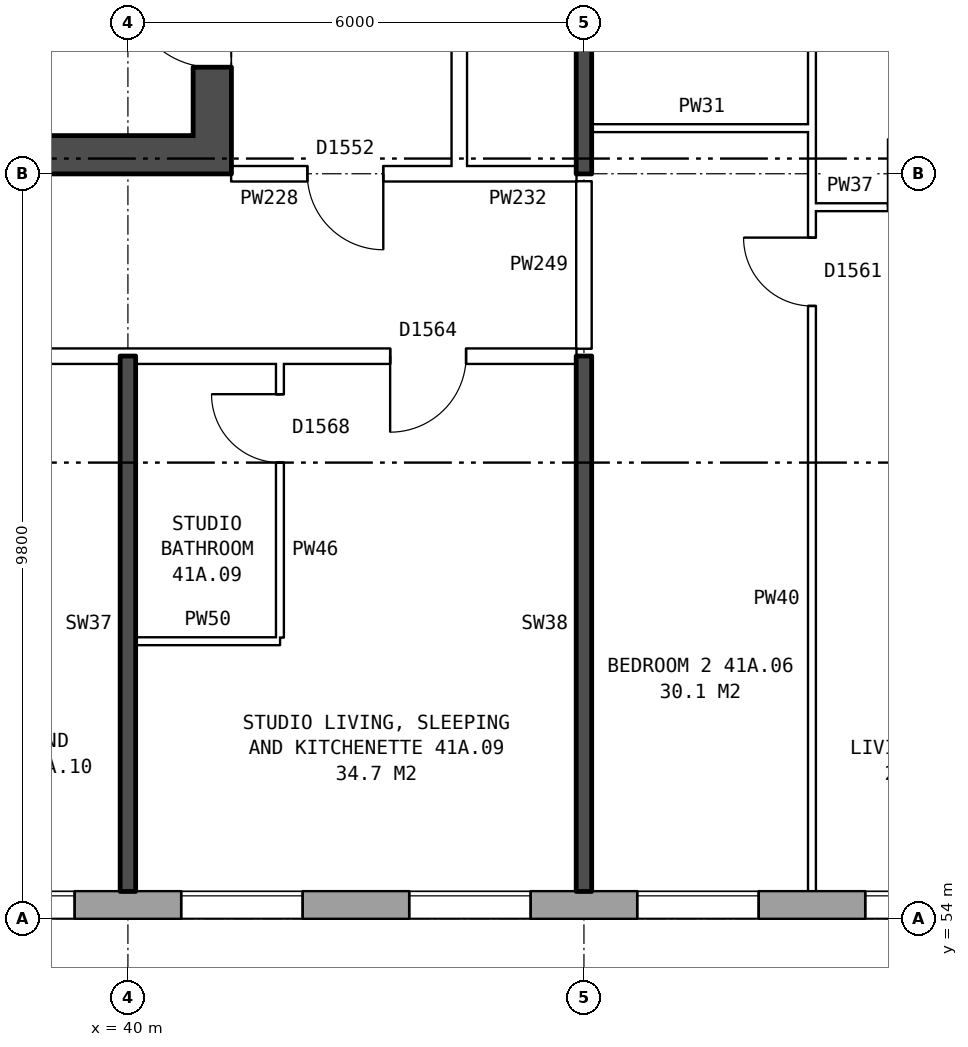
"""IFC4 building model, lengths in metres.
Left out: names, types, materials, properties, quantities, classifications, styles, units other than length and angle.
Written with IfcOpenShell. Run it as: python <this file> out.ifc"""

import sys

from ifc_helpers import new_model, si_unit, direction, frame, frame_2d, origin, place, context, subcontext, project, spatial, rectangle, extrude, element, fill, save


model = new_model("IFC4")
c1 = context("Model", 3, precision=1e-05, world=origin(), true_north=direction((0.0, 1.0)))
c2 = subcontext(c1, "Body", "Model", "MODEL_VIEW")
j1 = project(units=[si_unit("LENGTHUNIT", "METRE"), si_unit("PLANEANGLEUNIT", "RADIAN")], contexts=[c1])
p1 = place(None, origin())
s1 = spatial("IfcSite", under=j1, at=p1, CompositionType="ELEMENT")
p2 = place(p1, origin())
s2 = spatial("IfcBuilding", under=s1, at=p2, CompositionType="ELEMENT")
p3 = place(p2, frame((0.0, 0.0, 148.5)))
s3 = spatial("IfcBuildingStorey", under=s2, at=p3, CompositionType="ELEMENT", Elevation=148.5)
p4 = place(p3, frame((31.575, 54.18, 0.0), z_axis=(0.0, 0.0, 1.0), x_axis=(1.0, 0.0, 0.0)))
e1 = element("IfcWall", 1, at=p4, inside=s3, PredefinedType="STANDARD", context=c2, shape_type="SweptSolid", body=[
    extrude(rectangle(XDim=41.351, YDim=0.36, at=frame_2d((20.675, 0.0))), origin(), (0.0, 0.0, 1.0), 2.85),
])
p5 = place(p4, frame((3.125, 0.0, 0.8)))
e2 = element("IfcOpeningElement", 2, at=p5, cuts=e1, PredefinedType="OPENING", context=c2, shape_type="SweptSolid", body=[
    extrude(rectangle(XDim=1.6, YDim=1.8, at=frame_2d((0.8, 0.9))), frame((0.0, 0.19, 0.0), z_axis=(0.0, -1.0, 0.0), x_axis=(1.0, 0.0, 0.0)), (0.0, 0.0, 1.0), 0.38),
])
p6 = place(p4, frame((6.125, 0.0, 0.8)))
e3 = element("IfcOpeningElement", 3, at=p6, cuts=e1, PredefinedType="OPENING", context=c2, shape_type="SweptSolid", body=[
    extrude(rectangle(XDim=1.6, YDim=1.8, at=frame_2d((0.8, 0.9))), frame((0.0, 0.19, 0.0), z_axis=(0.0, -1.0, 0.0), x_axis=(1.0, 0.0, 0.0)), (0.0, 0.0, 1.0), 0.38),
])
p7 = place(p4, frame((9.125, 0.0, 0.8)))
e4 = element("IfcOpeningElement", 4, at=p7, cuts=e1, PredefinedType="OPENING", context=c2, shape_type="SweptSolid", body=[
    extrude(rectangle(XDim=1.6, YDim=1.8, at=frame_2d((0.8, 0.9))), frame((0.0, 0.19, 0.0), z_axis=(0.0, -1.0, 0.0), x_axis=(1.0, 0.0, 0.0)), (0.0, 0.0, 1.0), 0.38),
])
p8 = place(p4, frame((12.125, 0.0, 0.8)))
e5 = element("IfcOpeningElement", 5, at=p8, cuts=e1, PredefinedType="OPENING", context=c2, shape_type="SweptSolid", body=[
    extrude(rectangle(XDim=1.6, YDim=1.8, at=frame_2d((0.8, 0.9))), frame((0.0, 0.19, 0.0), z_axis=(0.0, -1.0, 0.0), x_axis=(1.0, 0.0, 0.0)), (0.0, 0.0, 1.0), 0.38),
])
p9 = place(p4, frame((15.125, 0.0, 0.8)))
e6 = element("IfcOpeningElement", 6, at=p9, cuts=e1, PredefinedType="OPENING", context=c2, shape_type="SweptSolid", body=[
    extrude(rectangle(XDim=1.6, YDim=1.8, at=frame_2d((0.8, 0.9))), frame((0.0, 0.19, 0.0), z_axis=(0.0, -1.0, 0.0), x_axis=(1.0, 0.0, 0.0)), (0.0, 0.0, 1.0), 0.38),
])
p10 = place(p4, frame((18.125, 0.0, 0.8)))
e7 = element("IfcOpeningElement", 7, at=p10, cuts=e1, PredefinedType="OPENING", context=c2, shape_type="SweptSolid", body=[
    extrude(rectangle(XDim=1.6, YDim=1.8, at=frame_2d((0.8, 0.9))), frame((0.0, 0.19, 0.0), z_axis=(0.0, -1.0, 0.0), x_axis=(1.0, 0.0, 0.0)), (0.0, 0.0, 1.0), 0.38),
])
p11 = place(p4, frame((21.125, 0.0, 0.8)))
e8 = element("IfcOpeningElement", 8, at=p11, cuts=e1, PredefinedType="OPENING", context=c2, shape_type="SweptSolid", body=[
    extrude(rectangle(XDim=1.6, YDim=1.8, at=frame_2d((0.8, 0.9))), frame((0.0, 0.19, 0.0), z_axis=(0.0, -1.0, 0.0), x_axis=(1.0, 0.0, 0.0)), (0.0, 0.0, 1.0), 0.38),
])
p12 = place(p4, frame((24.125, 0.0, 0.8)))
e9 = element("IfcOpeningElement", 9, at=p12, cuts=e1, PredefinedType="OPENING", context=c2, shape_type="SweptSolid", body=[
    extrude(rectangle(XDim=1.6, YDim=1.8, at=frame_2d((0.8, 0.9))), frame((0.0, 0.19, 0.0), z_axis=(0.0, -1.0, 0.0), x_axis=(1.0, 0.0, 0.0)), (0.0, 0.0, 1.0), 0.38),
])
p13 = place(p4, frame((27.125, 0.0, 0.8)))
e10 = element("IfcOpeningElement", 10, at=p13, cuts=e1, PredefinedType="OPENING", context=c2, shape_type="SweptSolid", body=[
    extrude(rectangle(XDim=1.6, YDim=1.8, at=frame_2d((0.8, 0.9))), frame((0.0, 0.19, 0.0), z_axis=(0.0, -1.0, 0.0), x_axis=(1.0, 0.0, 0.0)), (0.0, 0.0, 1.0), 0.38),
])
p14 = place(p4, frame((30.125, 0.0, 0.8)))
e11 = element("IfcOpeningElement", 11, at=p14, cuts=e1, PredefinedType="OPENING", context=c2, shape_type="SweptSolid", body=[
    extrude(rectangle(XDim=1.6, YDim=1.8, at=frame_2d((0.8, 0.9))), frame((0.0, 0.19, 0.0), z_axis=(0.0, -1.0, 0.0), x_axis=(1.0, 0.0, 0.0)), (0.0, 0.0, 1.0), 0.38),
])
p15 = place(p4, frame((33.125, 0.0, 0.8)))
e12 = element("IfcOpeningElement", 12, at=p15, cuts=e1, PredefinedType="OPENING", context=c2, shape_type="SweptSolid", body=[
    extrude(rectangle(XDim=1.6, YDim=1.8, at=frame_2d((0.8, 0.9))), frame((0.0, 0.19, 0.0), z_axis=(0.0, -1.0, 0.0), x_axis=(1.0, 0.0, 0.0)), (0.0, 0.0, 1.0), 0.38),
])
p16 = place(p4, frame((36.125, 0.0, 0.8)))
e13 = element("IfcOpeningElement", 13, at=p16, cuts=e1, PredefinedType="OPENING", context=c2, shape_type="SweptSolid", body=[
    extrude(rectangle(XDim=1.6, YDim=1.8, at=frame_2d((0.8, 0.9))), frame((0.0, 0.19, 0.0), z_axis=(0.0, -1.0, 0.0), x_axis=(1.0, 0.0, 0.0)), (0.0, 0.0, 1.0), 0.38),
])
p17 = place(p4, frame((38.625, 0.0, 0.8)))
e14 = element("IfcOpeningElement", 14, at=p17, cuts=e1, PredefinedType="OPENING", context=c2, shape_type="SweptSolid", body=[
    extrude(rectangle(XDim=1.2, YDim=1.8, at=frame_2d((0.6, 0.9))), frame((0.0, 0.19, 0.0), z_axis=(0.0, -1.0, 0.0), x_axis=(1.0, 0.0, 0.0)), (0.0, 0.0, 1.0), 0.38),
])
p18 = place(p4, frame((40.125, 0.0, 0.8)))
e15 = element("IfcOpeningElement", 15, at=p18, cuts=e1, PredefinedType="OPENING", context=c2, shape_type="SweptSolid", body=[
    extrude(rectangle(XDim=0.8, YDim=0.9, at=frame_2d((0.4, 0.45))), frame((0.0, 0.19, 0.0), z_axis=(0.0, -1.0, 0.0), x_axis=(1.0, 0.0, 0.0)), (0.0, 0.0, 1.0), 0.38),
])
p19 = place(p3, frame((41.11, 76.2, 0.0), z_axis=(0.0, 0.0, 1.0), x_axis=(0.0, -1.0, 0.0)))
e16 = element("IfcWall", 16, at=p19, inside=s3, PredefinedType="SHEAR", context=c2, shape_type="SweptSolid", body=[
    extrude(rectangle(XDim=12.4, YDim=0.5, at=frame_2d((6.2, 0.0))), origin(), (0.0, 0.0, 1.0), 2.85),
])
p20 = place(p19, frame((1.325, 0.0, 0.0)))
e17 = element("IfcOpeningElement", 17, at=p20, cuts=e16, PredefinedType="OPENING", context=c2, shape_type="SweptSolid", body=[
    extrude(rectangle(XDim=1.1, YDim=2.1, at=frame_2d((0.55, 1.05))), frame((0.0, 0.26, 0.0), z_axis=(0.0, -1.0, 0.0), x_axis=(1.0, 0.0, 0.0)), (0.0, 0.0, 1.0), 0.52),
])
p21 = place(p19, frame((4.225, 0.0, 0.0)))
e18 = element("IfcOpeningElement", 18, at=p21, cuts=e16, PredefinedType="OPENING", context=c2, shape_type="SweptSolid", body=[
    extrude(rectangle(XDim=0.85, YDim=2.1, at=frame_2d((0.425, 1.05))), frame((0.0, 0.26, 0.0), z_axis=(0.0, -1.0, 0.0), x_axis=(1.0, 0.0, 0.0)), (0.0, 0.0, 1.0), 0.52),
])
p22 = place(p19, frame((7.475, 0.0, 0.0)))
e19 = element("IfcOpeningElement", 19, at=p22, cuts=e16, PredefinedType="OPENING", context=c2, shape_type="SweptSolid", body=[
    extrude(rectangle(XDim=0.85, YDim=2.1, at=frame_2d((0.425, 1.05))), frame((0.0, 0.26, 0.0), z_axis=(0.0, -1.0, 0.0), x_axis=(1.0, 0.0, 0.0)), (0.0, 0.0, 1.0), 0.52),
])
p23 = place(p19, frame((9.9, 0.0, 0.0)))
e20 = element("IfcOpeningElement", 20, at=p23, cuts=e16, PredefinedType="OPENING", context=c2, shape_type="SweptSolid", body=[
    extrude(rectangle(XDim=1.1, YDim=2.1, at=frame_2d((0.55, 1.05))), frame((0.0, 0.26, 0.0), z_axis=(0.0, -1.0, 0.0), x_axis=(1.0, 0.0, 0.0)), (0.0, 0.0, 1.0), 0.52),
])
p24 = place(p3, frame((40.86, 64.05, 0.0), z_axis=(0.0, 0.0, 1.0), x_axis=(-1.0, 0.0, 0.0)))
e21 = element("IfcWall", 21, at=p24, inside=s3, PredefinedType="SHEAR", context=c2, shape_type="SweptSolid", body=[
    extrude(rectangle(XDim=8.0, YDim=0.5, at=frame_2d((4.0, 0.0))), origin(), (0.0, 0.0, 1.0), 2.85),
])
p25 = place(p3, frame((44.36, 63.9, 0.0), z_axis=(0.0, 0.0, 1.0), x_axis=(0.0, 1.0, 0.0)))
e22 = element("IfcWall", 22, at=p25, inside=s3, PredefinedType="PARTITIONING", context=c2, shape_type="SweptSolid", body=[
    extrude(rectangle(XDim=12.2, YDim=0.2, at=frame_2d((6.1, 0.0))), origin(), (0.0, 0.0, 1.0), 2.85),
])
p26 = place(p25, frame((5.1, 0.0, 0.0)))
e23 = element("IfcOpeningElement", 23, at=p26, cuts=e22, PredefinedType="OPENING", context=c2, shape_type="SweptSolid", body=[
    extrude(rectangle(XDim=2.0, YDim=2.1, at=frame_2d((1.0, 1.05))), frame((0.0, 0.11, 0.0), z_axis=(0.0, -1.0, 0.0), x_axis=(1.0, 0.0, 0.0)), (0.0, 0.0, 1.0), 0.22),
])
p27 = place(p3, frame((40.1, 57.65, 0.0), z_axis=(0.0, 0.0, 1.0), x_axis=(1.0, 0.0, 0.0)))
e24 = element("IfcWall", 24, at=p27, inside=s3, PredefinedType="PARTITIONING", context=c2, shape_type="SweptSolid", body=[
    extrude(rectangle(XDim=1.9, YDim=0.1, at=frame_2d((0.95, 0.0))), origin(), (0.0, 0.0, 1.0), 2.85),
])
p28 = place(p3, frame((28.86, 61.4, 0.0), z_axis=(0.0, 0.0, 1.0), x_axis=(1.0, 0.0, 0.0)))
e25 = element("IfcWall", 25, at=p28, inside=s3, PredefinedType="PARTITIONING", context=c2, shape_type="SweptSolid", body=[
    extrude(rectangle(XDim=17.04, YDim=0.2, at=frame_2d((8.52, 0.0))), origin(), (0.0, 0.0, 1.0), 2.85),
])
p29 = place(p28, frame((14.59, 0.0, 0.0)))
e26 = element("IfcOpeningElement", 26, at=p29, cuts=e25, PredefinedType="OPENING", context=c2, shape_type="SweptSolid", body=[
    extrude(rectangle(XDim=1.0, YDim=2.1, at=frame_2d((0.5, 1.05))), frame((0.0, 0.11, 0.0), z_axis=(0.0, -1.0, 0.0), x_axis=(1.0, 0.0, 0.0)), (0.0, 0.0, 1.0), 0.22),
])
p30 = place(p28, frame((7.64, 0.0, 0.0)))
e27 = element("IfcOpeningElement", 27, at=p30, cuts=e25, PredefinedType="OPENING", context=c2, shape_type="SweptSolid", body=[
    extrude(rectangle(XDim=1.0, YDim=2.1, at=frame_2d((0.5, 1.05))), frame((0.0, 0.11, 0.0), z_axis=(0.0, -1.0, 0.0), x_axis=(1.0, 0.0, 0.0)), (0.0, 0.0, 1.0), 0.22),
])
p31 = place(p3, frame((49.0, 63.36, 0.0), z_axis=(0.0, 0.0, 1.0), x_axis=(1.0, 0.0, 0.0)))
e28 = element("IfcWall", 28, at=p31, inside=s3, PredefinedType="PARTITIONING", context=c2, shape_type="SweptSolid", body=[
    extrude(rectangle(XDim=2.9, YDim=0.1, at=frame_2d((1.45, 0.0))), origin(), (0.0, 0.0, 1.0), 2.85),
])
p32 = place(p31, frame((1.0, 0.0, 0.0)))
e29 = element("IfcOpeningElement", 29, at=p32, cuts=e28, PredefinedType="OPENING", context=c2, shape_type="SweptSolid", body=[
    extrude(rectangle(XDim=0.9, YDim=2.1, at=frame_2d((0.45, 1.05))), frame((0.0, 0.06, 0.0), z_axis=(0.0, -1.0, 0.0), x_axis=(1.0, 0.0, 0.0)), (0.0, 0.0, 1.0), 0.12),
])
p33 = place(p3, frame((41.36, 63.8, 0.0), z_axis=(0.0, 0.0, 1.0), x_axis=(1.0, 0.0, 0.0)))
e30 = element("IfcWall", 30, at=p33, inside=s3, PredefinedType="PARTITIONING", context=c2, shape_type="SweptSolid", body=[
    extrude(rectangle(XDim=3.0, YDim=0.2, at=frame_2d((1.5, 0.0))), origin(), (0.0, 0.0, 1.0), 2.85),
])
p34 = place(p33, frame((1.0, 0.0, 0.0)))
e31 = element("IfcOpeningElement", 31, at=p34, cuts=e30, PredefinedType="OPENING", context=c2, shape_type="SweptSolid", body=[
    extrude(rectangle(XDim=1.0, YDim=2.1, at=frame_2d((0.5, 1.05))), frame((0.0, 0.11, 0.0), z_axis=(0.0, -1.0, 0.0), x_axis=(1.0, 0.0, 0.0)), (0.0, 0.0, 1.0), 0.22),
])
p35 = place(p3, frame((44.36, 63.8, 0.0), z_axis=(0.0, 0.0, 1.0), x_axis=(1.0, 0.0, 0.0)))
e32 = element("IfcWall", 32, at=p35, inside=s3, PredefinedType="PARTITIONING", context=c2, shape_type="SweptSolid", body=[
    extrude(rectangle(XDim=1.54, YDim=0.2, at=frame_2d((0.77, 0.0))), origin(), (0.0, 0.0, 1.0), 2.85),
])
p36 = place(p3, frame((46.1, 64.4, 0.0), z_axis=(0.0, 0.0, 1.0), x_axis=(1.0, 0.0, 0.0)))
e33 = element("IfcWall", 33, at=p36, inside=s3, PredefinedType="PARTITIONING", context=c2, shape_type="SweptSolid", body=[
    extrude(rectangle(XDim=2.9, YDim=0.1, at=frame_2d((1.45, 0.0))), origin(), (0.0, 0.0, 1.0), 2.85),
])
p37 = place(p3, frame((40.0, 54.36, 0.0), z_axis=(0.0, 0.0, 1.0), x_axis=(0.0, 1.0, 0.0)))
e34 = element("IfcWall", 34, at=p37, inside=s3, PredefinedType="SOLIDWALL", context=c2, shape_type="SweptSolid", body=[
    extrude(rectangle(XDim=7.04, YDim=0.2, at=frame_2d((3.52, 0.0))), origin(), (0.0, 0.0, 1.0), 2.85),
])
p38 = place(p3, frame((42.0, 57.7, 0.0), z_axis=(0.0, 0.0, 1.0), x_axis=(0.0, 1.0, 0.0)))
e35 = element("IfcWall", 35, at=p38, inside=s3, PredefinedType="PARTITIONING", context=c2, shape_type="SweptSolid", body=[
    extrude(rectangle(XDim=3.6, YDim=0.1, at=frame_2d((1.8, 0.0))), origin(), (0.0, 0.0, 1.0), 2.85),
])
p39 = place(p38, frame((2.3, 0.0, 0.0)))
e36 = element("IfcOpeningElement", 36, at=p39, cuts=e35, PredefinedType="OPENING", context=c2, shape_type="SweptSolid", body=[
    extrude(rectangle(XDim=0.9, YDim=2.1, at=frame_2d((0.45, 1.05))), frame((0.0, 0.06, 0.0), z_axis=(0.0, -1.0, 0.0), x_axis=(1.0, 0.0, 0.0)), (0.0, 0.0, 1.0), 0.12),
])
p40 = place(p3, frame((46.0, 54.36, 0.0), z_axis=(0.0, 0.0, 1.0), x_axis=(0.0, 1.0, 0.0)))
e37 = element("IfcWall", 37, at=p40, inside=s3, PredefinedType="SOLIDWALL", context=c2, shape_type="SweptSolid", body=[
    extrude(rectangle(XDim=7.04, YDim=0.2, at=frame_2d((3.52, 0.0))), origin(), (0.0, 0.0, 1.0), 2.85),
])
p41 = place(p3, frame((46.0, 61.5, 0.0), z_axis=(0.0, 0.0, 1.0), x_axis=(0.0, 1.0, 0.0)))
e38 = element("IfcWall", 38, at=p41, inside=s3, PredefinedType="PARTITIONING", context=c2, shape_type="SweptSolid", body=[
    extrude(rectangle(XDim=2.2, YDim=0.2, at=frame_2d((1.1, 0.0))), origin(), (0.0, 0.0, 1.0), 2.85),
])
p42 = place(p3, frame((46.0, 63.8, 0.0), z_axis=(0.0, 0.0, 1.0), x_axis=(0.0, 1.0, 0.0)))
e39 = element("IfcWall", 39, at=p42, inside=s3, PredefinedType="SOLIDWALL", context=c2, shape_type="SweptSolid", body=[
    extrude(rectangle(XDim=5.0, YDim=0.2, at=frame_2d((2.5, 0.0))), origin(), (0.0, 0.0, 1.0), 2.85),
])
p43 = place(p3, frame((49.0, 54.36, 0.0), z_axis=(0.0, 0.0, 1.0), x_axis=(0.0, 1.0, 0.0)))
e40 = element("IfcWall", 40, at=p43, inside=s3, PredefinedType="PARTITIONING", context=c2, shape_type="SweptSolid", body=[
    extrude(rectangle(XDim=14.34, YDim=0.1, at=frame_2d((7.17, 0.0))), origin(), (0.0, 0.0, 1.0), 2.85),
])
p44 = place(p43, frame((7.7, 0.0, 0.0)))
e41 = element("IfcOpeningElement", 41, at=p44, cuts=e40, PredefinedType="OPENING", context=c2, shape_type="SweptSolid", body=[
    extrude(rectangle(XDim=0.9, YDim=2.1, at=frame_2d((0.45, 1.05))), frame((0.0, 0.06, 0.0), z_axis=(0.0, -1.0, 0.0), x_axis=(1.0, 0.0, 0.0)), (0.0, 0.0, 1.0), 0.12),
])
p45 = place(p43, frame((13.04, 0.0, 0.0)))
e42 = element("IfcOpeningElement", 42, at=p45, cuts=e40, PredefinedType="OPENING", context=c2, shape_type="SweptSolid", body=[
    extrude(rectangle(XDim=0.9, YDim=2.1, at=frame_2d((0.45, 1.05))), frame((0.0, 0.06, 0.0), z_axis=(0.0, -1.0, 0.0), x_axis=(1.0, 0.0, 0.0)), (0.0, 0.0, 1.0), 0.12),
])
p46 = place(p6, origin())
e43 = element("IfcWindow", 43, at=p46, inside=s3, PartitioningType="SINGLE_PANEL", PredefinedType="WINDOW", context=c2, shape_type="SweptSolid", body=[
    extrude(rectangle(XDim=1.6, YDim=1.8, at=frame_2d((0.8, 0.9))), frame((0.0, 0.15, 0.0), z_axis=(0.0, -1.0, 0.0), x_axis=(1.0, 0.0, 0.0)), (0.0, 0.0, 1.0), 0.06),
])
fill(e3, e43)
p47 = place(p7, origin())
e44 = element("IfcWindow", 44, at=p47, inside=s3, PartitioningType="SINGLE_PANEL", PredefinedType="WINDOW", context=c2, shape_type="SweptSolid", body=[
    extrude(rectangle(XDim=1.6, YDim=1.8, at=frame_2d((0.8, 0.9))), frame((0.0, 0.15, 0.0), z_axis=(0.0, -1.0, 0.0), x_axis=(1.0, 0.0, 0.0)), (0.0, 0.0, 1.0), 0.06),
])
fill(e4, e44)
p48 = place(p8, origin())
e45 = element("IfcWindow", 45, at=p48, inside=s3, PartitioningType="SINGLE_PANEL", PredefinedType="WINDOW", context=c2, shape_type="SweptSolid", body=[
    extrude(rectangle(XDim=1.6, YDim=1.8, at=frame_2d((0.8, 0.9))), frame((0.0, 0.15, 0.0), z_axis=(0.0, -1.0, 0.0), x_axis=(1.0, 0.0, 0.0)), (0.0, 0.0, 1.0), 0.06),
])
fill(e5, e45)
p49 = place(p9, origin())
e46 = element("IfcWindow", 46, at=p49, inside=s3, PartitioningType="SINGLE_PANEL", PredefinedType="WINDOW", context=c2, shape_type="SweptSolid", body=[
    extrude(rectangle(XDim=1.6, YDim=1.8, at=frame_2d((0.8, 0.9))), frame((0.0, 0.15, 0.0), z_axis=(0.0, -1.0, 0.0), x_axis=(1.0, 0.0, 0.0)), (0.0, 0.0, 1.0), 0.06),
])
fill(e6, e46)
p50 = place(p10, origin())
e47 = element("IfcWindow", 47, at=p50, inside=s3, PartitioningType="SINGLE_PANEL", PredefinedType="WINDOW", context=c2, shape_type="SweptSolid", body=[
    extrude(rectangle(XDim=1.6, YDim=1.8, at=frame_2d((0.8, 0.9))), frame((0.0, 0.15, 0.0), z_axis=(0.0, -1.0, 0.0), x_axis=(1.0, 0.0, 0.0)), (0.0, 0.0, 1.0), 0.06),
])
fill(e7, e47)
p51 = place(p23, frame((1.1, 0.0, 0.0), z_axis=(0.0, 0.0, 1.0), x_axis=(-1.0, 0.0, 0.0)))
e48 = element("IfcDoor", 48, at=p51, inside=s3, OperationType="SINGLE_SWING_RIGHT", PredefinedType="DOOR", context=c2, shape_type="SweptSolid", body=[
    extrude(rectangle(XDim=1.1, YDim=2.1, at=frame_2d((0.55, 1.05))), frame((0.0, 0.235, 0.0), z_axis=(0.0, -1.0, 0.0), x_axis=(1.0, 0.0, 0.0)), (0.0, 0.0, 1.0), 0.05),
])
fill(e20, e48)
p52 = place(p34, frame((1.0, 0.0, 0.0), z_axis=(0.0, 0.0, 1.0), x_axis=(-1.0, 0.0, 0.0)))
e49 = element("IfcDoor", 49, at=p52, inside=s3, OperationType="SINGLE_SWING_LEFT", PredefinedType="DOOR", context=c2, shape_type="SweptSolid", body=[
    extrude(rectangle(XDim=1.0, YDim=2.1, at=frame_2d((0.5, 1.05))), frame((0.0, 0.025, 0.0), z_axis=(0.0, -1.0, 0.0), x_axis=(1.0, 0.0, 0.0)), (0.0, 0.0, 1.0), 0.05),
])
fill(e31, e49)
p53 = place(p44, origin())
e50 = element("IfcDoor", 50, at=p53, inside=s3, OperationType="SINGLE_SWING_RIGHT", PredefinedType="DOOR", context=c2, shape_type="SweptSolid", body=[
    extrude(rectangle(XDim=0.9, YDim=2.1, at=frame_2d((0.45, 1.05))), frame((0.0, 0.025, 0.0), z_axis=(0.0, -1.0, 0.0), x_axis=(1.0, 0.0, 0.0)), (0.0, 0.0, 1.0), 0.05),
])
fill(e41, e50)
p54 = place(p29, frame((1.0, 0.0, 0.0), z_axis=(0.0, 0.0, 1.0), x_axis=(-1.0, 0.0, 0.0)))
e51 = element("IfcDoor", 51, at=p54, inside=s3, OperationType="SINGLE_SWING_RIGHT", PredefinedType="DOOR", context=c2, shape_type="SweptSolid", body=[
    extrude(rectangle(XDim=1.0, YDim=2.1, at=frame_2d((0.5, 1.05))), frame((0.0, 0.025, 0.0), z_axis=(0.0, -1.0, 0.0), x_axis=(1.0, 0.0, 0.0)), (0.0, 0.0, 1.0), 0.05),
])
fill(e26, e51)
p55 = place(p39, origin())
e52 = element("IfcDoor", 52, at=p55, inside=s3, OperationType="SINGLE_SWING_RIGHT", PredefinedType="DOOR", context=c2, shape_type="SweptSolid", body=[
    extrude(rectangle(XDim=0.9, YDim=2.1, at=frame_2d((0.45, 1.05))), frame((0.0, 0.025, 0.0), z_axis=(0.0, -1.0, 0.0), x_axis=(1.0, 0.0, 0.0)), (0.0, 0.0, 1.0), 0.05),
])
fill(e36, e52)
save(model, sys.argv[1])
